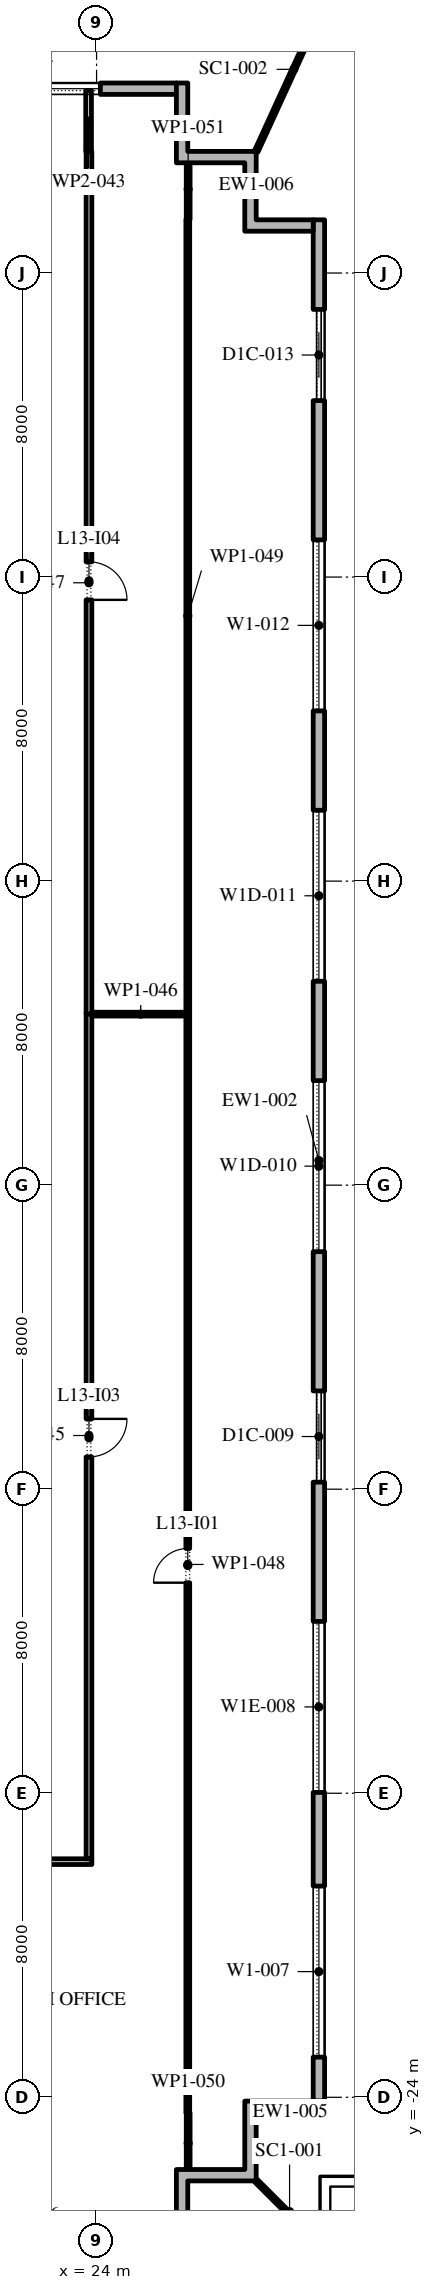
"""IFC4 building model, lengths in metres.
Left out: names, types, materials, properties, quantities, classifications, styles, units other than length and angle.
Written with IfcOpenShell. Run it as: python <this file> out.ifc"""

import sys

from ifc_helpers import new_model, si_unit, direction, frame, frame_2d, origin, place, context, subcontext, project, spatial, polyline, rectangle, outline, extrude, element, fill, save


model = new_model("IFC4")
c1 = context("Model", 3, precision=1e-05, world=origin(), true_north=direction((0.0, 1.0)))
c2 = subcontext(c1, "Body", "Model", "MODEL_VIEW")
j1 = project(units=[si_unit("LENGTHUNIT", "METRE"), si_unit("PLANEANGLEUNIT", "RADIAN")], contexts=[c1])
p1 = place(None, origin())
s1 = spatial("IfcSite", under=j1, at=p1, CompositionType="ELEMENT")
p2 = place(p1, origin())
s2 = spatial("IfcBuilding", under=s1, at=p2, CompositionType="ELEMENT")
p3 = place(p2, frame((0.0, 0.0, 64.8)))
s3 = spatial("IfcBuildingStorey", under=s2, at=p3, CompositionType="ELEMENT", Elevation=64.8)
p4 = place(p3, frame((29.85, -24.1, 0.0), z_axis=(0.0, 0.0, 1.0), x_axis=(0.0, 1.0, 0.0)))
e1 = element("IfcWall", 1, at=p4, inside=s3, PredefinedType="STANDARD", context=c2, shape_type="SweptSolid", body=[
    extrude(rectangle(XDim=49.5, YDim=0.3, at=frame_2d((24.75, 0.0))), origin(), (0.0, 0.0, 1.0), 4.0),
])
p5 = place(p4, frame((1.157, 0.0, 0.45)))
e2 = element("IfcOpeningElement", 2, at=p5, cuts=e1, PredefinedType="OPENING", context=c2, shape_type="SweptSolid", body=[
    extrude(rectangle(XDim=4.5, YDim=3.05, at=frame_2d((2.25, 1.525))), frame((0.0, 0.16, 0.0), z_axis=(0.0, -1.0, 0.0), x_axis=(1.0, 0.0, 0.0)), (0.0, 0.0, 1.0), 0.32),
])
p6 = place(p4, frame((8.121, 0.0, 0.45)))
e3 = element("IfcOpeningElement", 3, at=p6, cuts=e1, PredefinedType="OPENING", context=c2, shape_type="SweptSolid", body=[
    extrude(rectangle(XDim=4.5, YDim=2.825, at=frame_2d((2.25, 1.413))), frame((0.0, 0.16, 0.0), z_axis=(0.0, -1.0, 0.0), x_axis=(1.0, 0.0, 0.0)), (0.0, 0.0, 1.0), 0.32),
])
p7 = place(p4, frame((16.286, 0.0, 0.0)))
e4 = element("IfcOpeningElement", 4, at=p7, cuts=e1, PredefinedType="OPENING", context=c2, shape_type="SweptSolid", body=[
    extrude(rectangle(XDim=2.4, YDim=3.325, at=frame_2d((1.2, 1.663))), frame((0.0, 0.16, 0.0), z_axis=(0.0, -1.0, 0.0), x_axis=(1.0, 0.0, 0.0)), (0.0, 0.0, 1.0), 0.32),
])
p8 = place(p4, frame((22.35, 0.0, 0.45)))
e5 = element("IfcOpeningElement", 5, at=p8, cuts=e1, PredefinedType="OPENING", context=c2, shape_type="SweptSolid", body=[
    extrude(rectangle(XDim=4.5, YDim=2.875, at=frame_2d((2.25, 1.438))), frame((0.0, 0.16, 0.0), z_axis=(0.0, -1.0, 0.0), x_axis=(1.0, 0.0, 0.0)), (0.0, 0.0, 1.0), 0.32),
])
p9 = place(p4, frame((29.464, 0.0, 0.45)))
e6 = element("IfcOpeningElement", 6, at=p9, cuts=e1, PredefinedType="OPENING", context=c2, shape_type="SweptSolid", body=[
    extrude(rectangle(XDim=4.5, YDim=2.875, at=frame_2d((2.25, 1.438))), frame((0.0, 0.16, 0.0), z_axis=(0.0, -1.0, 0.0), x_axis=(1.0, 0.0, 0.0)), (0.0, 0.0, 1.0), 0.32),
])
p10 = place(p4, frame((36.579, 0.0, 0.45)))
e7 = element("IfcOpeningElement", 7, at=p10, cuts=e1, PredefinedType="OPENING", context=c2, shape_type="SweptSolid", body=[
    extrude(rectangle(XDim=4.5, YDim=3.05, at=frame_2d((2.25, 1.525))), frame((0.0, 0.16, 0.0), z_axis=(0.0, -1.0, 0.0), x_axis=(1.0, 0.0, 0.0)), (0.0, 0.0, 1.0), 0.32),
])
p11 = place(p4, frame((44.743, 0.0, 0.0)))
e8 = element("IfcOpeningElement", 8, at=p11, cuts=e1, PredefinedType="OPENING", context=c2, shape_type="SweptSolid", body=[
    extrude(rectangle(XDim=2.4, YDim=3.325, at=frame_2d((1.2, 1.663))), frame((0.0, 0.16, 0.0), z_axis=(0.0, -1.0, 0.0), x_axis=(1.0, 0.0, 0.0)), (0.0, 0.0, 1.0), 0.32),
])
p12 = place(p3, frame((26.1, 28.85, 0.0), z_axis=(0.0, 0.0, 1.0), x_axis=(-1.0, 0.0, 0.0)))
e9 = element("IfcWall", 9, at=p12, inside=s3, PredefinedType="STANDARD", context=c2, shape_type="SweptSolid", body=[
    extrude(rectangle(XDim=52.5, YDim=0.3, at=frame_2d((26.25, 0.0))), origin(), (0.0, 0.0, 1.0), 4.0),
])
p13 = place(p12, frame((2.0, 0.0, 0.45)))
e10 = element("IfcOpeningElement", 10, at=p13, cuts=e9, PredefinedType="OPENING", context=c2, shape_type="SweptSolid", body=[
    extrude(rectangle(XDim=4.5, YDim=2.95, at=frame_2d((2.25, 1.475))), frame((0.0, 0.16, 0.0), z_axis=(0.0, -1.0, 0.0), x_axis=(1.0, 0.0, 0.0)), (0.0, 0.0, 1.0), 0.32),
])
p14 = place(p12, frame((10.65, 0.0, 0.45)))
e11 = element("IfcOpeningElement", 11, at=p14, cuts=e9, PredefinedType="OPENING", context=c2, shape_type="SweptSolid", body=[
    extrude(rectangle(XDim=4.5, YDim=2.95, at=frame_2d((2.25, 1.475))), frame((0.0, 0.16, 0.0), z_axis=(0.0, -1.0, 0.0), x_axis=(1.0, 0.0, 0.0)), (0.0, 0.0, 1.0), 0.32),
])
p15 = place(p12, frame((20.5, 0.0, 0.0)))
e12 = element("IfcOpeningElement", 12, at=p15, cuts=e9, PredefinedType="OPENING", context=c2, shape_type="SweptSolid", body=[
    extrude(rectangle(XDim=2.4, YDim=3.5, at=frame_2d((1.2, 1.75))), frame((0.0, 0.16, 0.0), z_axis=(0.0, -1.0, 0.0), x_axis=(1.0, 0.0, 0.0)), (0.0, 0.0, 1.0), 0.32),
])
p16 = place(p12, frame((28.25, 0.0, 0.45)))
e13 = element("IfcOpeningElement", 13, at=p16, cuts=e9, PredefinedType="OPENING", context=c2, shape_type="SweptSolid", body=[
    extrude(rectangle(XDim=4.5, YDim=2.95, at=frame_2d((2.25, 1.475))), frame((0.0, 0.16, 0.0), z_axis=(0.0, -1.0, 0.0), x_axis=(1.0, 0.0, 0.0)), (0.0, 0.0, 1.0), 0.32),
])
p17 = place(p12, frame((37.05, 0.0, 0.45)))
e14 = element("IfcOpeningElement", 14, at=p17, cuts=e9, PredefinedType="OPENING", context=c2, shape_type="SweptSolid", body=[
    extrude(rectangle(XDim=4.5, YDim=2.95, at=frame_2d((2.25, 1.475))), frame((0.0, 0.16, 0.0), z_axis=(0.0, -1.0, 0.0), x_axis=(1.0, 0.0, 0.0)), (0.0, 0.0, 1.0), 0.32),
])
p18 = place(p12, frame((45.85, 0.0, 0.45)))
e15 = element("IfcOpeningElement", 15, at=p18, cuts=e9, PredefinedType="OPENING", context=c2, shape_type="SweptSolid", body=[
    extrude(rectangle(XDim=4.5, YDim=2.95, at=frame_2d((2.25, 1.475))), frame((0.0, 0.16, 0.0), z_axis=(0.0, -1.0, 0.0), x_axis=(1.0, 0.0, 0.0)), (0.0, 0.0, 1.0), 0.32),
])
p19 = place(p3, origin())
e16 = element("IfcWall", 16, at=p19, inside=s3, PredefinedType="STANDARD", context=c2, shape_type="SweptSolid", body=[
    extrude(outline(polyline([(27.9, -25.9), (27.9, -24.1), (30.0, -24.1), (30.0, -24.4), (28.2, -24.4), (28.2, -26.2), (26.4, -26.2), (26.4, -27.7), (26.1, -27.7), (26.1, -25.9), (27.9, -25.9)])), origin(), (0.0, 0.0, 1.0), 4.0),
])
p20 = place(p3, origin())
e17 = element("IfcWall", 17, at=p20, inside=s3, PredefinedType="STANDARD", context=c2, shape_type="SweptSolid", body=[
    extrude(outline(polyline([(27.9, 26.9), (26.1, 26.9), (26.1, 29.0), (26.4, 29.0), (26.4, 27.2), (28.2, 27.2), (28.2, 25.4), (29.7, 25.4), (29.7, 25.1), (27.9, 25.1), (27.9, 26.9)])), origin(), (0.0, 0.0, 1.0), 4.0),
])
p21 = place(p3, frame((28.2, -26.2, -0.05), z_axis=(0.0, 0.0, 1.0), x_axis=(0.707106781187, -0.707106781187, 0.0)))
e18 = element("IfcWall", 18, at=p21, inside=s3, PredefinedType="STANDARD", context=c2, shape_type="SweptSolid", body=[
    extrude(rectangle(XDim=2.385, YDim=0.1, at=frame_2d((1.192, 0.0))), origin(), (0.0, 0.0, 1.0), 4.05),
])
p22 = place(p3, frame((28.2, 27.2, -0.05), z_axis=(0.0, 0.0, 1.0), x_axis=(0.416654710493, 0.909064822894, 0.0)))
e19 = element("IfcWall", 19, at=p22, inside=s3, PredefinedType="STANDARD", context=c2, shape_type="SweptSolid", body=[
    extrude(rectangle(XDim=4.75, YDim=0.1, at=frame_2d((2.375, 0.0))), origin(), (0.0, 0.0, 1.0), 4.05),
])
p23 = place(p3, frame((23.79, 28.8, 0.0), z_axis=(0.0, 0.0, 1.0), x_axis=(0.0, -1.0, 0.0)))
e20 = element("IfcWall", 20, at=p23, inside=s3, PredefinedType="PARTITIONING", context=c2, shape_type="SweptSolid", body=[
    extrude(rectangle(XDim=1.6, YDim=0.15, at=frame_2d((0.8, 0.0))), origin(), (0.0, 0.0, 1.0), 4.0),
])
p24 = place(p3, frame((23.875, -17.8, 0.0), z_axis=(0.0, 0.0, 1.0), x_axis=(-1.0, 0.0, 0.0)))
e21 = element("IfcWall", 21, at=p24, inside=s3, PredefinedType="PARTITIONING", context=c2, shape_type="SweptSolid", body=[
    extrude(rectangle(XDim=6.275, YDim=0.15, at=frame_2d((3.137, 0.0))), origin(), (0.0, 0.0, 1.0), 4.0),
])
p25 = place(p3, frame((23.8, 4.55, 0.0), z_axis=(0.0, 0.0, 1.0), x_axis=(0.0, -1.0, 0.0)))
e22 = element("IfcWall", 22, at=p25, inside=s3, PredefinedType="PARTITIONING", context=c2, shape_type="SweptSolid", body=[
    extrude(rectangle(XDim=22.275, YDim=0.15, at=frame_2d((11.138, 0.0))), origin(), (0.0, 0.0, 1.0), 4.0),
])
p26 = place(p25, frame((10.7, 0.0, 0.0)))
e23 = element("IfcOpeningElement", 23, at=p26, cuts=e22, PredefinedType="OPENING", context=c2, shape_type="SweptSolid", body=[
    extrude(rectangle(XDim=1.0, YDim=2.1, at=frame_2d((0.5, 1.05))), frame((0.0, 0.085, 0.0), z_axis=(0.0, -1.0, 0.0), x_axis=(1.0, 0.0, 0.0)), (0.0, 0.0, 1.0), 0.17),
])
p27 = place(p3, frame((23.875, 4.5, 0.0), z_axis=(0.0, 0.0, 1.0), x_axis=(1.0, 0.0, 0.0)))
e24 = element("IfcWall", 24, at=p27, inside=s3, PredefinedType="PARTITIONING", context=c2, shape_type="SweptSolid", body=[
    extrude(rectangle(XDim=2.575, YDim=0.1, at=frame_2d((1.288, 0.0))), origin(), (0.0, 0.0, 1.0), 4.0),
])
p28 = place(p3, frame((23.8, 27.2, 0.0), z_axis=(0.0, 0.0, 1.0), x_axis=(0.0, -1.0, 0.0)))
e25 = element("IfcWall", 25, at=p28, inside=s3, PredefinedType="PARTITIONING", context=c2, shape_type="SweptSolid", body=[
    extrude(rectangle(XDim=22.7, YDim=0.15, at=frame_2d((11.35, 0.0))), origin(), (0.0, 0.0, 1.0), 4.0),
])
p29 = place(p28, frame((10.8, 0.0, 0.0)))
e26 = element("IfcOpeningElement", 26, at=p29, cuts=e25, PredefinedType="OPENING", context=c2, shape_type="SweptSolid", body=[
    extrude(rectangle(XDim=1.0, YDim=2.1, at=frame_2d((0.5, 1.05))), frame((0.0, 0.085, 0.0), z_axis=(0.0, -1.0, 0.0), x_axis=(1.0, 0.0, 0.0)), (0.0, 0.0, 1.0), 0.17),
])
p30 = place(p3, frame((26.4, -24.41, 0.0), z_axis=(0.0, 0.0, 1.0), x_axis=(0.0, 1.0, 0.0)))
e27 = element("IfcWall", 27, at=p30, inside=s3, PredefinedType="PARTITIONING", context=c2, shape_type="SweptSolid", body=[
    extrude(rectangle(XDim=28.86, YDim=0.1, at=frame_2d((14.43, 0.0))), origin(), (0.0, 0.0, 1.0), 4.0),
])
p31 = place(p30, frame((13.95, 0.0, 0.0)))
e28 = element("IfcOpeningElement", 28, at=p31, cuts=e27, PredefinedType="OPENING", context=c2, shape_type="SweptSolid", body=[
    extrude(rectangle(XDim=0.9, YDim=2.1, at=frame_2d((0.45, 1.05))), frame((0.0, 0.06, 0.0), z_axis=(0.0, -1.0, 0.0), x_axis=(1.0, 0.0, 0.0)), (0.0, 0.0, 1.0), 0.12),
])
p32 = place(p3, frame((26.4, 4.55, 0.0), z_axis=(0.0, 0.0, 1.0), x_axis=(0.0, 1.0, 0.0)))
e29 = element("IfcWall", 29, at=p32, inside=s3, PredefinedType="PARTITIONING", context=c2, shape_type="SweptSolid", body=[
    extrude(rectangle(XDim=20.86, YDim=0.1, at=frame_2d((10.43, 0.0))), origin(), (0.0, 0.0, 1.0), 4.0),
])
for number, where, z_axis, x_axis in (
    (30, (26.41, -26.0, 0.0), (0.0, 0.0, 1.0), (0.0, 1.0, 0.0)),
    (31, (26.41, 25.41, 0.0), (0.0, 0.0, 1.0), (0.0, 1.0, 0.0)),
):
    element("IfcWall", number, at=place(p3, frame(where, z_axis=z_axis, x_axis=x_axis)), inside=s3, PredefinedType="PARTITIONING", context=c2, shape_type="SweptSolid", body=[
        extrude(rectangle(XDim=1.59, YDim=0.1, at=frame_2d((0.795, 0.0))), origin(), (0.0, 0.0, 1.0), 4.0),
    ])
p33 = place(p5, origin())
e32 = element("IfcWindow", 32, at=p33, inside=s3, PartitioningType="DOUBLE_PANEL_VERTICAL", PredefinedType="WINDOW", context=c2, shape_type="SweptSolid", body=[
    extrude(rectangle(XDim=4.5, YDim=3.05, at=frame_2d((2.25, 1.525))), frame((0.0, 0.03, 0.0), z_axis=(0.0, -1.0, 0.0), x_axis=(1.0, 0.0, 0.0)), (0.0, 0.0, 1.0), 0.06),
])
fill(e2, e32)
p34 = place(p6, origin())
e33 = element("IfcWindow", 33, at=p34, inside=s3, PartitioningType="DOUBLE_PANEL_VERTICAL", PredefinedType="WINDOW", context=c2, shape_type="SweptSolid", body=[
    extrude(rectangle(XDim=4.5, YDim=2.825, at=frame_2d((2.25, 1.413))), frame((0.0, 0.03, 0.0), z_axis=(0.0, -1.0, 0.0), x_axis=(1.0, 0.0, 0.0)), (0.0, 0.0, 1.0), 0.06),
])
fill(e3, e33)
p35 = place(p7, origin())
e34 = element("IfcDoor", 34, at=p35, inside=s3, OperationType="DOUBLE_DOOR_SLIDING", PredefinedType="DOOR", context=c2, shape_type="SweptSolid", body=[
    extrude(rectangle(XDim=2.4, YDim=3.325, at=frame_2d((1.2, 1.663))), frame((0.0, 0.025, 0.0), z_axis=(0.0, -1.0, 0.0), x_axis=(1.0, 0.0, 0.0)), (0.0, 0.0, 1.0), 0.05),
])
fill(e4, e34)
p36 = place(p8, origin())
e35 = element("IfcWindow", 35, at=p36, inside=s3, PartitioningType="DOUBLE_PANEL_VERTICAL", PredefinedType="WINDOW", context=c2, shape_type="SweptSolid", body=[
    extrude(rectangle(XDim=4.5, YDim=2.875, at=frame_2d((2.25, 1.438))), frame((0.0, 0.03, 0.0), z_axis=(0.0, -1.0, 0.0), x_axis=(1.0, 0.0, 0.0)), (0.0, 0.0, 1.0), 0.06),
])
fill(e5, e35)
p37 = place(p9, origin())
e36 = element("IfcWindow", 36, at=p37, inside=s3, PartitioningType="DOUBLE_PANEL_VERTICAL", PredefinedType="WINDOW", context=c2, shape_type="SweptSolid", body=[
    extrude(rectangle(XDim=4.5, YDim=2.875, at=frame_2d((2.25, 1.438))), frame((0.0, 0.03, 0.0), z_axis=(0.0, -1.0, 0.0), x_axis=(1.0, 0.0, 0.0)), (0.0, 0.0, 1.0), 0.06),
])
fill(e6, e36)
p38 = place(p10, origin())
e37 = element("IfcWindow", 37, at=p38, inside=s3, PartitioningType="DOUBLE_PANEL_VERTICAL", PredefinedType="WINDOW", context=c2, shape_type="SweptSolid", body=[
    extrude(rectangle(XDim=4.5, YDim=3.05, at=frame_2d((2.25, 1.525))), frame((0.0, 0.03, 0.0), z_axis=(0.0, -1.0, 0.0), x_axis=(1.0, 0.0, 0.0)), (0.0, 0.0, 1.0), 0.06),
])
fill(e7, e37)
p39 = place(p11, origin())
e38 = element("IfcDoor", 38, at=p39, inside=s3, OperationType="DOUBLE_DOOR_SLIDING", PredefinedType="DOOR", context=c2, shape_type="SweptSolid", body=[
    extrude(rectangle(XDim=2.4, YDim=3.325, at=frame_2d((1.2, 1.663))), frame((0.0, 0.025, 0.0), z_axis=(0.0, -1.0, 0.0), x_axis=(1.0, 0.0, 0.0)), (0.0, 0.0, 1.0), 0.05),
])
fill(e8, e38)
p40 = place(p13, origin())
e39 = element("IfcWindow", 39, at=p40, inside=s3, PartitioningType="DOUBLE_PANEL_VERTICAL", PredefinedType="WINDOW", context=c2, shape_type="SweptSolid", body=[
    extrude(rectangle(XDim=4.5, YDim=2.95, at=frame_2d((2.25, 1.475))), frame((0.0, 0.03, 0.0), z_axis=(0.0, -1.0, 0.0), x_axis=(1.0, 0.0, 0.0)), (0.0, 0.0, 1.0), 0.06),
])
fill(e10, e39)
p41 = place(p31, origin())
e40 = element("IfcDoor", 40, at=p41, inside=s3, OperationType="SINGLE_SWING_RIGHT", PredefinedType="DOOR", context=c2, shape_type="SweptSolid", body=[
    extrude(rectangle(XDim=0.9, YDim=2.1, at=frame_2d((0.45, 1.05))), frame((0.0, 0.025, 0.0), z_axis=(0.0, -1.0, 0.0), x_axis=(1.0, 0.0, 0.0)), (0.0, 0.0, 1.0), 0.05),
])
fill(e28, e40)
p42 = place(p26, origin())
e41 = element("IfcDoor", 41, at=p42, inside=s3, OperationType="SINGLE_SWING_RIGHT", PredefinedType="DOOR", context=c2, shape_type="SweptSolid", body=[
    extrude(rectangle(XDim=1.0, YDim=2.1, at=frame_2d((0.5, 1.05))), frame((0.0, 0.025, 0.0), z_axis=(0.0, -1.0, 0.0), x_axis=(1.0, 0.0, 0.0)), (0.0, 0.0, 1.0), 0.05),
])
fill(e23, e41)
p43 = place(p29, origin())
e42 = element("IfcDoor", 42, at=p43, inside=s3, OperationType="SINGLE_SWING_LEFT", PredefinedType="DOOR", context=c2, shape_type="SweptSolid", body=[
    extrude(rectangle(XDim=1.0, YDim=2.1, at=frame_2d((0.5, 1.05))), frame((0.0, 0.025, 0.0), z_axis=(0.0, -1.0, 0.0), x_axis=(1.0, 0.0, 0.0)), (0.0, 0.0, 1.0), 0.05),
])
fill(e26, e42)
save(model, sys.argv[1])
